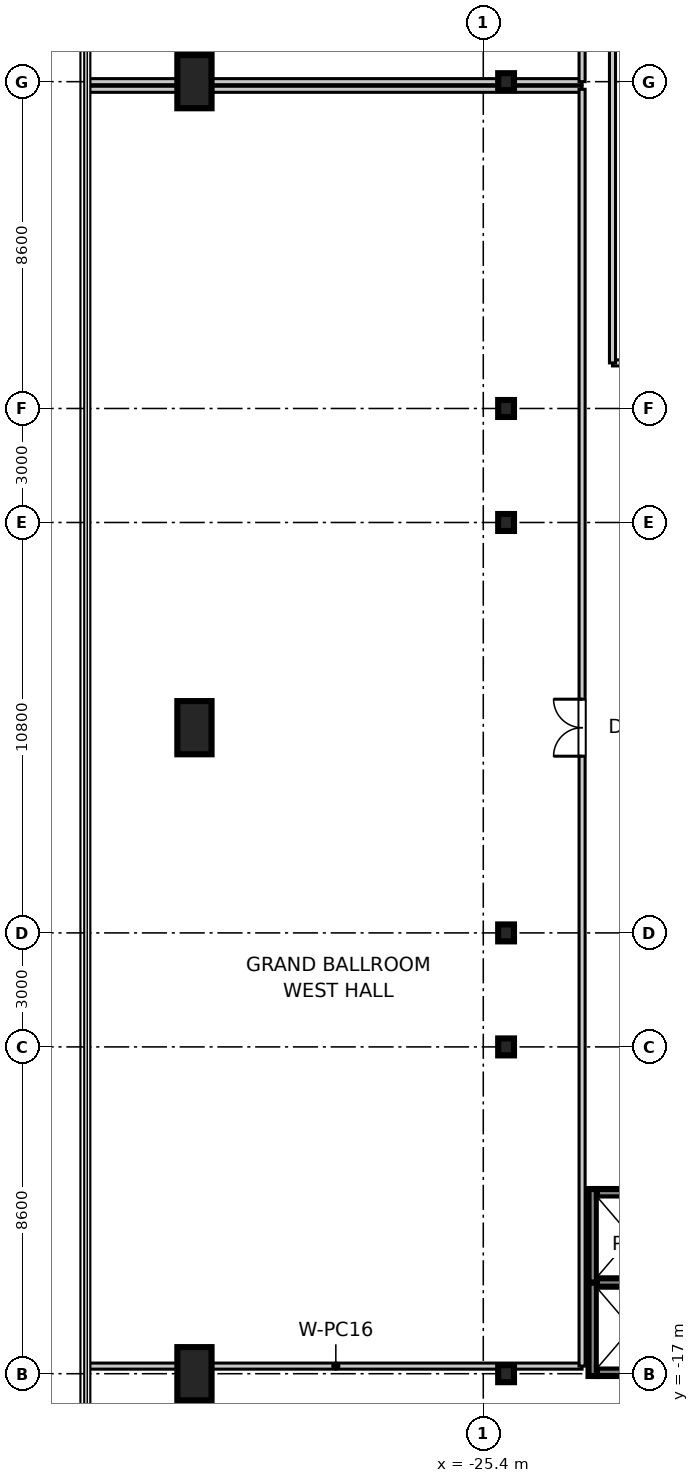
"""IFC4 building model, lengths in metres.
Left out: names, types, materials, properties, quantities, classifications, styles, units other than length and angle.
Written with IfcOpenShell. Run it as: python <this file> out.ifc"""

import sys

from ifc_helpers import new_model, si_unit, direction, frame, frame_2d, origin, origin_2d, place, context, subcontext, project, spatial, rectangle, i_section, extrude, source, transform, mapped, element, fill, save


model = new_model("IFC4")
c1 = context("Model", 3, precision=1e-05, world=origin(), true_north=direction((0.0, 1.0)))
c2 = subcontext(c1, "Body", "Model", "MODEL_VIEW")
j1 = project(units=[si_unit("LENGTHUNIT", "METRE"), si_unit("PLANEANGLEUNIT", "RADIAN")], contexts=[c1])
p1 = place(None, origin())
s1 = spatial("IfcSite", under=j1, at=p1, CompositionType="ELEMENT")
p2 = place(p1, origin())
s2 = spatial("IfcBuilding", under=s1, at=p2, CompositionType="ELEMENT")
p3 = place(p2, frame((0.0, 0.0, 16.2)))
s3 = spatial("IfcBuildingStorey", under=s2, at=p3, CompositionType="ELEMENT", Elevation=16.2)
m1 = source(origin(), c2, "Body", "SweptSolid", [
    extrude(rectangle(XDim=0.9, YDim=1.4, at=origin_2d()), origin(), (0.0, 0.0, 1.0), 5.355),
])
for number, where, z_axis, x_axis in (
    (1, (-33.0, -17.0, 0.0), (0.0, 0.0, 1.0), (1.0, 0.0, 0.0)),
    (2, (-33.0, 0.0, 0.0), (0.0, 0.0, 1.0), (1.0, 0.0, 0.0)),
    (3, (-33.0, 17.0, 0.0), (0.0, 0.0, 1.0), (1.0, 0.0, 0.0)),
):
    element("IfcColumn", number, at=place(p3, frame(where, z_axis=z_axis, x_axis=x_axis)), inside=s3, PredefinedType="PILASTER", context=c2, shape_type="MappedRepresentation", body=[
        mapped(m1, transform((0.0, 0.0, 0.0), scale=1.0)),
    ])
m2 = source(origin(), c2, "Body", "SweptSolid", [
    extrude(i_section(OverallWidth=0.416, OverallDepth=0.446, WebThickness=0.025, FlangeThickness=0.04, at=origin_2d()), origin(), (0.0, 0.0, 1.0), 5.355),
])
for number, where, z_axis, x_axis in (
    (4, (-24.8, -17.0, 0.0), (0.0, 0.0, 1.0), (1.0, 0.0, 0.0)),
    (5, (-24.8, -8.4, 0.0), (0.0, 0.0, 1.0), (1.0, 0.0, 0.0)),
    (6, (-24.8, -5.4, 0.0), (0.0, 0.0, 1.0), (1.0, 0.0, 0.0)),
    (7, (-24.8, 5.4, 0.0), (0.0, 0.0, 1.0), (1.0, 0.0, 0.0)),
    (8, (-24.8, 8.4, 0.0), (0.0, 0.0, 1.0), (1.0, 0.0, 0.0)),
    (9, (-24.8, 17.0, 0.0), (0.0, 0.0, 1.0), (1.0, 0.0, 0.0)),
):
    element("IfcColumn", number, at=place(p3, frame(where, z_axis=z_axis, x_axis=x_axis)), inside=s3, PredefinedType="COLUMN", context=c2, shape_type="MappedRepresentation", body=[
        mapped(m2, transform((0.0, 0.0, 0.0), scale=1.0)),
    ])
m3 = source(origin(), c2, "Body", "SweptSolid", [
    extrude(rectangle(XDim=2.46, YDim=0.22, at=frame_2d((1.23, 0.0))), origin(), (0.0, 0.0, 1.0), 5.08),
])
p4 = place(p3, frame((-22.52, -17.06, 0.0), z_axis=(0.0, 0.0, 1.0), x_axis=(0.0, 1.0, 0.0)))
e10 = element("IfcWall", 10, at=p4, inside=s3, PredefinedType="SHEAR", context=c2, shape_type="MappedRepresentation", body=[
    mapped(m3, transform((0.0, 0.0, 0.0), scale=1.0)),
])
m4 = source(origin(), c2, "Body", "SweptSolid", [
    extrude(rectangle(XDim=1.82, YDim=0.22, at=frame_2d((0.91, 0.0))), origin(), (0.0, 0.0, 1.0), 5.08),
])
p5 = place(p3, frame((-22.41, -16.95, 0.0), z_axis=(0.0, 0.0, 1.0), x_axis=(1.0, 0.0, 0.0)))
e11 = element("IfcWall", 11, at=p5, inside=s3, PredefinedType="SHEAR", context=c2, shape_type="MappedRepresentation", body=[
    mapped(m4, transform((0.0, 0.0, 0.0), scale=1.0)),
])
m5 = source(origin(), c2, "Body", "SweptSolid", [
    extrude(rectangle(XDim=1.82, YDim=0.22, at=frame_2d((0.91, 0.0))), origin(), (0.0, 0.0, 1.0), 5.4),
])
p6 = place(p3, frame((-22.41, -14.6, 0.0), z_axis=(0.0, 0.0, 1.0), x_axis=(1.0, 0.0, 0.0)))
e12 = element("IfcWall", 12, at=p6, inside=s3, PredefinedType="SHEAR", context=c2, shape_type="MappedRepresentation", body=[
    mapped(m5, transform((0.0, 0.0, 0.0), scale=1.0)),
])
m6 = source(origin(), c2, "Body", "SweptSolid", [
    extrude(rectangle(XDim=2.46, YDim=0.22, at=frame_2d((1.23, 0.0))), origin(), (0.0, 0.0, 1.0), 5.08),
])
p7 = place(p3, frame((-22.52, -14.6, 0.0), z_axis=(0.0, 0.0, 1.0), x_axis=(0.0, 1.0, 0.0)))
e13 = element("IfcWall", 13, at=p7, inside=s3, PredefinedType="SHEAR", context=c2, shape_type="MappedRepresentation", body=[
    mapped(m6, transform((0.0, 0.0, 0.0), scale=1.0)),
])
p8 = place(p3, frame((-22.41, -12.25, 0.0), z_axis=(0.0, 0.0, 1.0), x_axis=(1.0, 0.0, 0.0)))
e14 = element("IfcWall", 14, at=p8, inside=s3, PredefinedType="SHEAR", context=c2, shape_type="MappedRepresentation", body=[
    mapped(m4, transform((0.0, 0.0, 0.0), scale=1.0)),
])
m7 = source(origin(), c2, "Body", "SweptSolid", [
    extrude(rectangle(XDim=12.96, YDim=0.16, at=frame_2d((6.48, 0.0))), origin(), (0.0, 0.0, 1.0), 3.4),
])
for number, where, z_axis, x_axis in (
    (15, (-35.76, -16.8, 0.0), (0.0, 0.0, 1.0), (1.0, 0.0, 0.0)),
    (16, (-35.76, 16.8, 0.0), (0.0, 0.0, 1.0), (1.0, 0.0, 0.0)),
):
    element("IfcWall", number, at=place(p3, frame(where, z_axis=z_axis, x_axis=x_axis)), inside=s3, PredefinedType="PARTITIONING", context=c2, shape_type="MappedRepresentation", body=[
        mapped(m7, transform((0.0, 0.0, 0.0), scale=1.0)),
    ])
m8 = source(origin(), c2, "Body", "SweptSolid", [
    extrude(rectangle(XDim=33.6, YDim=0.16, at=frame_2d((16.8, 0.0))), origin(), (0.0, 0.0, 1.0), 3.4),
])
p9 = place(p3, frame((-22.8, -16.8, 0.0), z_axis=(0.0, 0.0, 1.0), x_axis=(0.0, 1.0, 0.0)))
e17 = element("IfcWall", 17, at=p9, inside=s3, PredefinedType="PARTITIONING", context=c2, shape_type="MappedRepresentation", body=[
    mapped(m8, transform((0.0, 0.0, 0.0), scale=1.0)),
])
p10 = place(p9, frame((16.05, 0.0, 0.0)))
e18 = element("IfcOpeningElement", 18, at=p10, cuts=e17, PredefinedType="OPENING", context=c2, shape_type="SweptSolid", body=[
    extrude(rectangle(XDim=1.5, YDim=2.15, at=frame_2d((0.75, 1.075))), frame((0.0, 0.09, 0.0), z_axis=(0.0, -1.0, 0.0), x_axis=(1.0, 0.0, 0.0)), (0.0, 0.0, 1.0), 0.18),
])
p11 = place(p3, frame((-35.76, 17.0, 0.0), z_axis=(0.0, 0.0, 1.0), x_axis=(1.0, 0.0, 0.0)))
e19 = element("IfcWall", 19, at=p11, inside=s3, PredefinedType="PARTITIONING", context=c2, shape_type="MappedRepresentation", body=[
    mapped(m7, transform((0.0, 0.0, 0.0), scale=1.0)),
])
m9 = source(origin(), c2, "Body", "SweptSolid", [
    extrude(rectangle(XDim=6.76, YDim=0.16, at=frame_2d((3.38, 0.0))), origin(), (0.0, 0.0, 1.0), 3.4),
])
p12 = place(p3, frame((-22.8, 17.0, 0.0), z_axis=(0.0, 0.0, 1.0), x_axis=(0.0, 1.0, 0.0)))
e20 = element("IfcWall", 20, at=p12, inside=s3, PredefinedType="PARTITIONING", context=c2, shape_type="MappedRepresentation", body=[
    mapped(m9, transform((0.0, 0.0, 0.0), scale=1.0)),
])
p13 = place(p12, frame((1.916, 0.0, 0.0)))
e21 = element("IfcOpeningElement", 21, at=p13, cuts=e20, PredefinedType="OPENING", context=c2, shape_type="SweptSolid", body=[
    extrude(rectangle(XDim=1.5, YDim=2.15, at=frame_2d((0.75, 1.075))), frame((0.0, 0.09, 0.0), z_axis=(0.0, -1.0, 0.0), x_axis=(1.0, 0.0, 0.0)), (0.0, 0.0, 1.0), 0.18),
])
m10 = source(origin(), c2, "Body", "SweptSolid", [
    extrude(rectangle(XDim=25.4, YDim=0.16, at=frame_2d((12.7, 0.0))), origin(), (0.0, 0.0, 1.0), 3.4),
])
p14 = place(p3, frame((-22.0, 9.6, 0.0), z_axis=(0.0, 0.0, 1.0), x_axis=(1.0, 0.0, 0.0)))
e22 = element("IfcWall", 22, at=p14, inside=s3, PredefinedType="PARTITIONING", context=c2, shape_type="MappedRepresentation", body=[
    mapped(m10, transform((0.0, 0.0, 0.0), scale=1.0)),
])
p15 = place(p14, frame((8.867, 0.0, 0.0)))
e23 = element("IfcOpeningElement", 23, at=p15, cuts=e22, PredefinedType="OPENING", context=c2, shape_type="SweptSolid", body=[
    extrude(rectangle(XDim=1.5, YDim=2.15, at=frame_2d((0.75, 1.075))), frame((0.0, 0.09, 0.0), z_axis=(0.0, -1.0, 0.0), x_axis=(1.0, 0.0, 0.0)), (0.0, 0.0, 1.0), 0.18),
])
m11 = source(origin(), c2, "Body", "SweptSolid", [
    extrude(rectangle(XDim=14.16, YDim=0.16, at=frame_2d((7.08, 0.0))), origin(), (0.0, 0.0, 1.0), 3.4),
])
p16 = place(p3, frame((-22.0, 9.6, 0.0), z_axis=(0.0, 0.0, 1.0), x_axis=(0.0, 1.0, 0.0)))
e24 = element("IfcWall", 24, at=p16, inside=s3, PredefinedType="PARTITIONING", context=c2, shape_type="MappedRepresentation", body=[
    mapped(m11, transform((0.0, 0.0, 0.0), scale=1.0)),
])
m12 = source(origin(), c2, "Body", "SweptSolid", [
    extrude(rectangle(XDim=1.5, YDim=2.15, at=frame_2d((0.75, 1.075))), frame((0.0, 0.025, 0.0), z_axis=(0.0, -1.0, 0.0), x_axis=(1.0, 0.0, 0.0)), (0.0, 0.0, 1.0), 0.05),
])
p17 = place(p10, origin())
e25 = element("IfcDoor", 25, at=p17, inside=s3, OperationType="DOUBLE_DOOR_SINGLE_SWING", PredefinedType="DOOR", context=c2, shape_type="MappedRepresentation", body=[
    mapped(m12, transform((0.0, 0.0, 0.0), scale=1.0)),
])
fill(e18, e25)
save(model, sys.argv[1])
